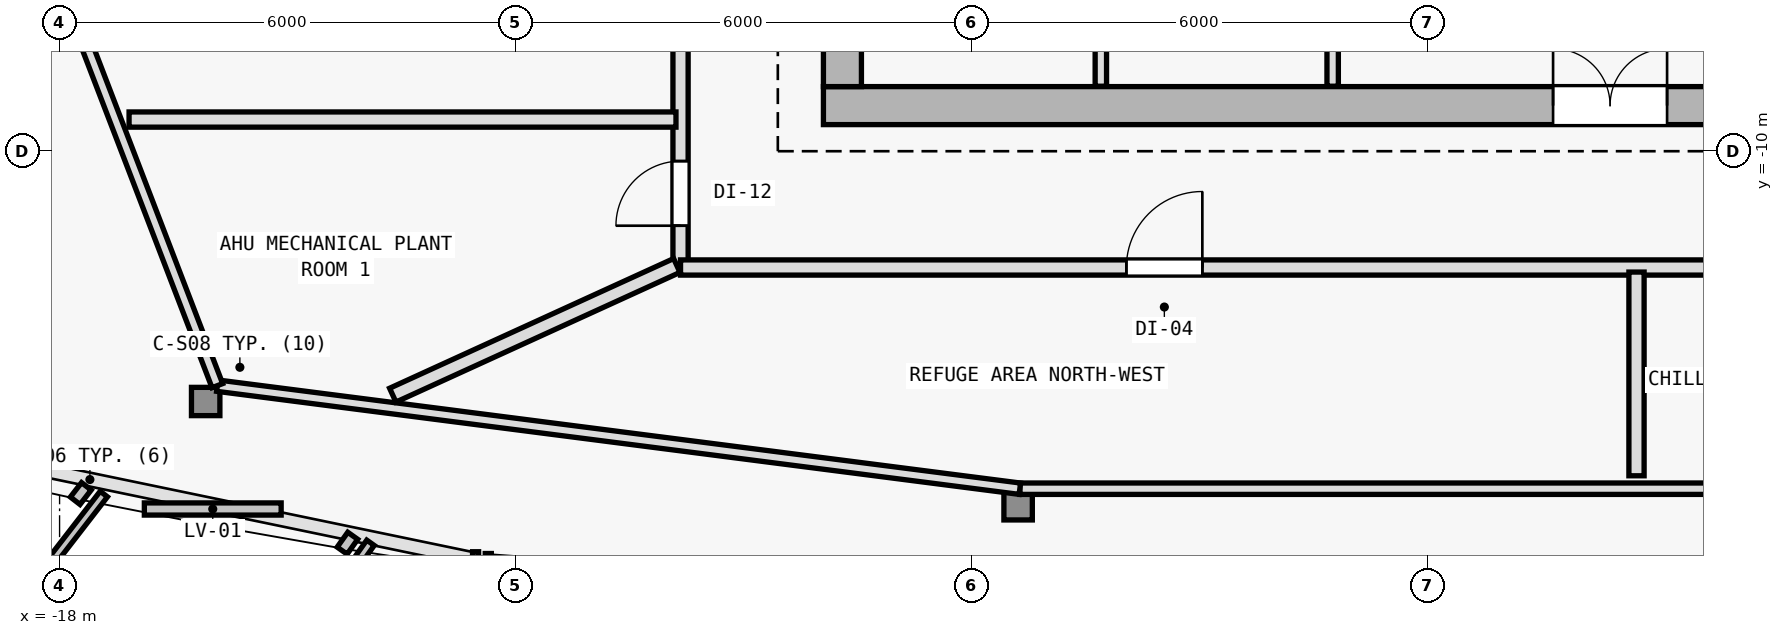
"""IFC4 building model, lengths in metres.
Left out: names, types, materials, properties, quantities, classifications, styles, units other than length and angle.
Written with IfcOpenShell. Run it as: python <this file> out.ifc"""

import sys

from ifc_helpers import new_model, si_unit, direction, frame, frame_2d, origin, origin_2d, place, context, subcontext, project, spatial, rectangle, i_section, extrude, element, fill, save


model = new_model("IFC4")
c1 = context("Model", 3, precision=1e-05, world=origin(), true_north=direction((0.0, 1.0)))
c2 = subcontext(c1, "Body", "Model", "MODEL_VIEW")
j1 = project(units=[si_unit("LENGTHUNIT", "METRE"), si_unit("PLANEANGLEUNIT", "RADIAN")], contexts=[c1])
p1 = place(None, origin())
s1 = spatial("IfcSite", under=j1, at=p1, CompositionType="ELEMENT")
p2 = place(p1, origin())
s2 = spatial("IfcBuilding", under=s1, at=p2, CompositionType="ELEMENT")
p3 = place(p2, frame((0.0, 0.0, 241.5)))
s3 = spatial("IfcBuildingStorey", under=s2, at=p3, CompositionType="ELEMENT", Elevation=241.5)
for number, where, z_axis, x_axis in (
    (1, (-7.7, -9.4, 0.0), (0.0, 0.0, 1.0), (1.0, 0.0, 0.0)),
    (2, (0.0, -9.4, 0.0), (0.0, 0.0, 1.0), (1.0, 0.0, 0.0)),
):
    element("IfcColumn", number, at=place(p3, frame(where, z_axis=z_axis, x_axis=x_axis)), inside=s3, PredefinedType="COLUMN", context=c2, shape_type="SweptSolid", body=[
        extrude(i_section(OverallWidth=0.398, OverallDepth=0.387, WebThickness=0.013, FlangeThickness=0.022, FilletRadius=0.015, at=origin_2d()), origin(), (0.0, 0.0, 1.0), 4.8),
    ])
p4 = place(p3, frame((-16.078, -13.293, 0.006), z_axis=(0.01589889458, 0.025784745697, 0.999541080717), x_axis=(-0.851195920716, 0.524848077596, 0.0)))
e3 = element("IfcColumn", 3, at=p4, inside=s3, PredefinedType="COLUMN", context=c2, shape_type="SweptSolid", body=[
    extrude(i_section(OverallWidth=0.374, OverallDepth=0.372, WebThickness=0.012, FlangeThickness=0.02, FilletRadius=0.015, at=origin_2d()), origin(), (0.0, 0.0, 1.0), 4.791),
])
p5 = place(p3, frame((-5.388, -14.665, 0.006), z_axis=(0.005300026585, 0.027213598042, 0.999615591015), x_axis=(-0.981557946631, 0.191164843539, 0.0)))
e4 = element("IfcColumn", 4, at=p5, inside=s3, PredefinedType="COLUMN", context=c2, shape_type="SweptSolid", body=[
    extrude(i_section(OverallWidth=0.374, OverallDepth=0.372, WebThickness=0.012, FlangeThickness=0.02, FilletRadius=0.015, at=origin_2d()), origin(), (0.0, 0.0, 1.0), 4.791),
])
p6 = place(p3, frame((-7.95, -9.4, 0.0), z_axis=(0.0, 0.0, 1.0), x_axis=(1.0, 0.0, 0.0)))
e5 = element("IfcWall", 5, at=p6, inside=s3, PredefinedType="SHEAR", context=c2, shape_type="SweptSolid", body=[
    extrude(rectangle(XDim=15.9, YDim=0.5, at=frame_2d((7.95, 0.0))), origin(), (0.0, 0.0, 1.0), 4.5),
])
p7 = place(p6, frame((9.6, 0.0, 0.0)))
e6 = element("IfcOpeningElement", 6, at=p7, cuts=e5, PredefinedType="OPENING", context=c2, shape_type="SweptSolid", body=[
    extrude(rectangle(XDim=1.5, YDim=2.2, at=frame_2d((0.75, 1.1))), frame((0.0, 0.26, 0.0), z_axis=(0.0, -1.0, 0.0), x_axis=(1.0, 0.0, 0.0)), (0.0, 0.0, 1.0), 0.52),
])
p8 = place(p3, frame((-7.7, -9.15, 0.0), z_axis=(0.0, 0.0, 1.0), x_axis=(0.0, 1.0, 0.0)))
e7 = element("IfcWall", 7, at=p8, inside=s3, PredefinedType="SHEAR", context=c2, shape_type="SweptSolid", body=[
    extrude(rectangle(XDim=19.1, YDim=0.5, at=frame_2d((9.55, 0.0))), origin(), (0.0, 0.0, 1.0), 4.5),
])
p9 = place(p8, frame((12.7, 0.0, 0.0)))
e8 = element("IfcOpeningElement", 8, at=p9, cuts=e7, PredefinedType="OPENING", context=c2, shape_type="SweptSolid", body=[
    extrude(rectangle(XDim=1.1, YDim=2.15, at=frame_2d((0.55, 1.075))), frame((0.0, 0.26, 0.0), z_axis=(0.0, -1.0, 0.0), x_axis=(1.0, 0.0, 0.0)), (0.0, 0.0, 1.0), 0.52),
])
p10 = place(p3, frame((-1.25, -9.145, 0.0), z_axis=(0.0, 0.0, 1.0), x_axis=(0.0, 1.0, 0.0)))
e9 = element("IfcWall", 9, at=p10, inside=s3, PredefinedType="PARTITIONING", context=c2, shape_type="SweptSolid", body=[
    extrude(rectangle(XDim=3.095, YDim=0.15, at=frame_2d((1.547, 0.0))), origin(), (0.0, 0.0, 1.0), 4.5),
])
p11 = place(p10, frame((0.845, 0.0, 0.0)))
e10 = element("IfcOpeningElement", 10, at=p11, cuts=e9, PredefinedType="OPENING", context=c2, shape_type="SweptSolid", body=[
    extrude(rectangle(XDim=0.95, YDim=2.1, at=frame_2d((0.475, 1.05))), frame((0.0, 0.085, 0.0), z_axis=(0.0, -1.0, 0.0), x_axis=(1.0, 0.0, 0.0)), (0.0, 0.0, 1.0), 0.17),
])
p12 = place(p3, frame((-4.3, -9.145, 0.0), z_axis=(0.0, 0.0, 1.0), x_axis=(0.0, 1.0, 0.0)))
e11 = element("IfcWall", 11, at=p12, inside=s3, PredefinedType="PARTITIONING", context=c2, shape_type="SweptSolid", body=[
    extrude(rectangle(XDim=3.095, YDim=0.15, at=frame_2d((1.547, 0.0))), origin(), (0.0, 0.0, 1.0), 4.5),
])
p13 = place(p12, frame((0.845, 0.0, 0.0)))
e12 = element("IfcOpeningElement", 12, at=p13, cuts=e11, PredefinedType="OPENING", context=c2, shape_type="SweptSolid", body=[
    extrude(rectangle(XDim=0.9, YDim=2.1, at=frame_2d((0.45, 1.05))), frame((0.0, 0.085, 0.0), z_axis=(0.0, -1.0, 0.0), x_axis=(1.0, 0.0, 0.0)), (0.0, 0.0, 1.0), 0.17),
])
p14 = place(p3, frame((5.365, -14.44, 0.0), z_axis=(0.0, 0.0, 1.0), x_axis=(-1.0, 0.0, 0.0)))
e13 = element("IfcWall", 13, at=p14, inside=s3, PredefinedType="PARTITIONING", context=c2, shape_type="SweptSolid", body=[
    extrude(rectangle(XDim=10.731, YDim=0.15, at=frame_2d((5.365, 0.0))), origin(), (0.0, 0.0, 1.0), 4.125),
])
p15 = place(p3, frame((-5.365, -14.44, 0.0), z_axis=(0.0, 0.0, 1.0), x_axis=(-0.991858136076, 0.127347704731, 0.0)))
e14 = element("IfcWall", 14, at=p15, inside=s3, PredefinedType="PARTITIONING", context=c2, shape_type="SweptSolid", body=[
    extrude(rectangle(XDim=10.646, YDim=0.15, at=frame_2d((5.323, 0.0))), origin(), (0.0, 0.0, 1.0), 4.125),
])
p16 = place(p3, frame((-15.925, -13.084, 0.0), z_axis=(0.0, 0.0, 1.0), x_axis=(-0.358205734872, 0.933642678708, 0.0)))
e15 = element("IfcWall", 15, at=p16, inside=s3, PredefinedType="PARTITIONING", context=c2, shape_type="SweptSolid", body=[
    extrude(rectangle(XDim=8.273, YDim=0.15, at=frame_2d((4.136, 0.0))), origin(), (0.0, 0.0, 1.0), 4.025),
])
p17 = place(p3, frame((-9.83, -11.53, 0.0), z_axis=(0.0, 0.0, 1.0), x_axis=(0.0, 1.0, 0.0)))
e16 = element("IfcWall", 16, at=p17, inside=s3, PredefinedType="SOLIDWALL", context=c2, shape_type="SweptSolid", body=[
    extrude(rectangle(XDim=17.81, YDim=0.2, at=frame_2d((8.905, 0.0))), origin(), (0.0, 0.0, 1.0), 3.925),
])
p18 = place(p17, frame((8.724, 0.0, 0.0)))
e17 = element("IfcOpeningElement", 17, at=p18, cuts=e16, PredefinedType="OPENING", context=c2, shape_type="SweptSolid", body=[
    extrude(rectangle(XDim=1.0, YDim=2.15, at=frame_2d((0.5, 1.075))), frame((0.0, 0.11, 0.0), z_axis=(0.0, -1.0, 0.0), x_axis=(1.0, 0.0, 0.0)), (0.0, 0.0, 1.0), 0.22),
])
p19 = place(p17, frame((0.55, 0.0, 0.0)))
e18 = element("IfcOpeningElement", 18, at=p19, cuts=e16, PredefinedType="OPENING", context=c2, shape_type="SweptSolid", body=[
    extrude(rectangle(XDim=0.85, YDim=2.1, at=frame_2d((0.425, 1.05))), frame((0.0, 0.11, 0.0), z_axis=(0.0, -1.0, 0.0), x_axis=(1.0, 0.0, 0.0)), (0.0, 0.0, 1.0), 0.22),
])
p20 = place(p3, frame((-9.83, -11.53, 0.0), z_axis=(0.0, 0.0, 1.0), x_axis=(1.0, 0.0, 0.0)))
e19 = element("IfcWall", 19, at=p20, inside=s3, PredefinedType="SOLIDWALL", context=c2, shape_type="SweptSolid", body=[
    extrude(rectangle(XDim=19.66, YDim=0.2, at=frame_2d((9.83, 0.0))), origin(), (0.0, 0.0, 1.0), 4.155),
])
p21 = place(p20, frame((5.865, 0.0, 0.0)))
e20 = element("IfcOpeningElement", 20, at=p21, cuts=e19, PredefinedType="OPENING", context=c2, shape_type="SweptSolid", body=[
    extrude(rectangle(XDim=1.0, YDim=2.15, at=frame_2d((0.5, 1.075))), frame((0.0, 0.11, 0.0), z_axis=(0.0, -1.0, 0.0), x_axis=(1.0, 0.0, 0.0)), (0.0, 0.0, 1.0), 0.22),
])
p22 = place(p20, frame((15.542, 0.0, 0.0)))
e21 = element("IfcOpeningElement", 21, at=p22, cuts=e19, PredefinedType="OPENING", context=c2, shape_type="SweptSolid", body=[
    extrude(rectangle(XDim=1.0, YDim=2.15, at=frame_2d((0.5, 1.075))), frame((0.0, 0.11, 0.0), z_axis=(0.0, -1.0, 0.0), x_axis=(1.0, 0.0, 0.0)), (0.0, 0.0, 1.0), 0.22),
])
p23 = place(p3, frame((-9.89, -9.583, 0.0), z_axis=(0.0, 0.0, 1.0), x_axis=(-1.0, 0.0, 0.0)))
e22 = element("IfcWall", 22, at=p23, inside=s3, PredefinedType="SOLIDWALL", context=c2, shape_type="SweptSolid", body=[
    extrude(rectangle(XDim=7.196, YDim=0.2, at=frame_2d((3.598, 0.0))), origin(), (0.0, 0.0, 1.0), 4.125),
])
p24 = place(p3, frame((-9.879, -11.503, 0.0), z_axis=(0.0, 0.0, 1.0), x_axis=(-0.909687515783, -0.415293418716, 0.0)))
e23 = element("IfcWall", 23, at=p24, inside=s3, PredefinedType="SOLIDWALL", context=c2, shape_type="SweptSolid", body=[
    extrude(rectangle(XDim=4.108, YDim=0.2, at=frame_2d((2.054, 0.0))), origin(), (0.0, 0.0, 1.0), 3.975),
])
p25 = place(p3, frame((2.748, -11.59, 0.0), z_axis=(0.0, 0.0, 1.0), x_axis=(0.0, -1.0, 0.0)))
e24 = element("IfcWall", 24, at=p25, inside=s3, PredefinedType="SOLIDWALL", context=c2, shape_type="SweptSolid", body=[
    extrude(rectangle(XDim=2.68, YDim=0.2, at=frame_2d((1.34, 0.0))), origin(), (0.0, 0.0, 1.0), 4.075),
])
p26 = place(p7, origin())
e25 = element("IfcDoor", 25, at=p26, inside=s3, OperationType="DOUBLE_DOOR_SINGLE_SWING", PredefinedType="DOOR", context=c2, shape_type="SweptSolid", body=[
    extrude(rectangle(XDim=1.5, YDim=2.2, at=frame_2d((0.75, 1.1))), frame((0.0, 0.025, 0.0), z_axis=(0.0, -1.0, 0.0), x_axis=(1.0, 0.0, 0.0)), (0.0, 0.0, 1.0), 0.05),
])
fill(e6, e25)
p27 = place(p19, origin())
e26 = element("IfcDoor", 26, at=p27, inside=s3, OperationType="SINGLE_SWING_LEFT", PredefinedType="DOOR", context=c2, shape_type="SweptSolid", body=[
    extrude(rectangle(XDim=0.85, YDim=2.1, at=frame_2d((0.425, 1.05))), frame((0.0, 0.025, 0.0), z_axis=(0.0, -1.0, 0.0), x_axis=(1.0, 0.0, 0.0)), (0.0, 0.0, 1.0), 0.05),
])
fill(e18, e26)
p28 = place(p21, origin())
e27 = element("IfcDoor", 27, at=p28, inside=s3, OperationType="SINGLE_SWING_RIGHT", PredefinedType="DOOR", context=c2, shape_type="SweptSolid", body=[
    extrude(rectangle(XDim=1.0, YDim=2.15, at=frame_2d((0.5, 1.075))), frame((0.0, 0.025, 0.0), z_axis=(0.0, -1.0, 0.0), x_axis=(1.0, 0.0, 0.0)), (0.0, 0.0, 1.0), 0.05),
])
fill(e20, e27)
save(model, sys.argv[1])
